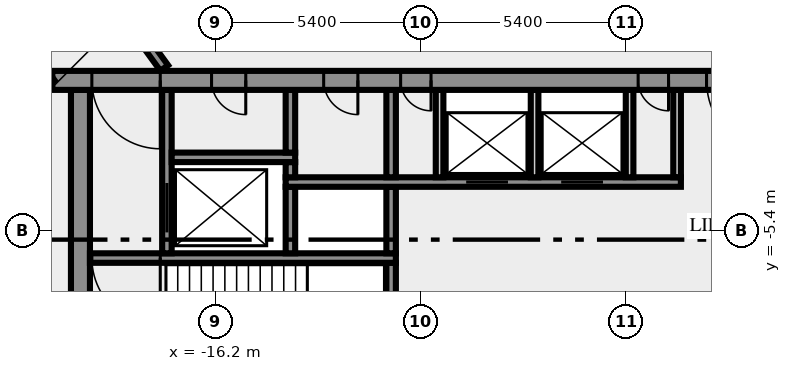
"""IFC4 building model, lengths in metres.
Left out: names, types, materials, properties, quantities, classifications, styles, units other than length and angle.
Written with IfcOpenShell. Run it as: python <this file> out.ifc"""

import sys

from ifc_helpers import new_model, si_unit, direction, frame, frame_2d, origin, place, context, subcontext, project, spatial, rectangle, extrude, element, fill, save


model = new_model("IFC4")
c1 = context("Model", 3, precision=1e-05, world=origin(), true_north=direction((0.0, 1.0)))
c2 = subcontext(c1, "Body", "Model", "MODEL_VIEW")
j1 = project(units=[si_unit("LENGTHUNIT", "METRE"), si_unit("PLANEANGLEUNIT", "RADIAN")], contexts=[c1])
p1 = place(None, origin())
s1 = spatial("IfcSite", under=j1, at=p1, CompositionType="ELEMENT")
p2 = place(p1, origin())
s2 = spatial("IfcBuilding", under=s1, at=p2, CompositionType="ELEMENT")
p3 = place(p2, frame((0.0, 0.0, 253.0)))
s3 = spatial("IfcBuildingStorey", under=s2, at=p3, CompositionType="ELEMENT", Elevation=253.0)
p4 = place(p3, frame((-19.75, -10.5, 0.0), z_axis=(0.0, 0.0, 1.0), x_axis=(0.0, 1.0, 0.0)))
e1 = element("IfcWall", 1, at=p4, inside=s3, PredefinedType="SHEAR", context=c2, shape_type="SweptSolid", body=[
    extrude(rectangle(XDim=8.8, YDim=0.5, at=frame_2d((4.4, 0.0))), origin(), (0.0, 0.0, 1.0), 3.65),
])
p5 = place(p3, frame((-11.575, -7.25, 0.0), z_axis=(0.0, 0.0, 1.0), x_axis=(0.0, 1.0, 0.0)))
e2 = element("IfcWall", 2, at=p5, inside=s3, PredefinedType="SHEAR", context=c2, shape_type="SweptSolid", body=[
    extrude(rectangle(XDim=1.0, YDim=0.25, at=frame_2d((0.5, 0.0))), origin(), (0.0, 0.0, 1.0), 3.65),
])
p6 = place(p3, frame((-11.45, -6.125, 0.0), z_axis=(0.0, 0.0, 1.0), x_axis=(-1.0, 0.0, 0.0)))
e3 = element("IfcWall", 3, at=p6, inside=s3, PredefinedType="SHEAR", context=c2, shape_type="SweptSolid", body=[
    extrude(rectangle(XDim=8.05, YDim=0.25, at=frame_2d((4.025, 0.0))), origin(), (0.0, 0.0, 1.0), 3.65),
])
p7 = place(p6, frame((6.2, 0.0, 0.0)))
e4 = element("IfcOpeningElement", 4, at=p7, cuts=e3, PredefinedType="OPENING", context=c2, shape_type="SweptSolid", body=[
    extrude(rectangle(XDim=1.8, YDim=2.1, at=frame_2d((0.9, 1.05))), frame((0.0, 0.135, 0.0), z_axis=(0.0, -1.0, 0.0), x_axis=(1.0, 0.0, 0.0)), (0.0, 0.0, 1.0), 0.27),
])
p8 = place(p3, frame((-17.475, -6.0, 0.0), z_axis=(0.0, 0.0, 1.0), x_axis=(0.0, 1.0, 0.0)))
e5 = element("IfcWall", 5, at=p8, inside=s3, PredefinedType="SHEAR", context=c2, shape_type="SweptSolid", body=[
    extrude(rectangle(XDim=4.3, YDim=0.25, at=frame_2d((2.15, 0.0))), origin(), (0.0, 0.0, 1.0), 3.65),
])
p9 = place(p8, frame((0.55, 0.0, 0.0)))
e6 = element("IfcOpeningElement", 6, at=p9, cuts=e5, PredefinedType="OPENING", context=c2, shape_type="SweptSolid", body=[
    extrude(rectangle(XDim=1.3, YDim=2.1, at=frame_2d((0.65, 1.05))), frame((0.0, 0.135, 0.0), z_axis=(0.0, -1.0, 0.0), x_axis=(1.0, 0.0, 0.0)), (0.0, 0.0, 1.0), 0.27),
])
for number, where, z_axis, x_axis in (
    (7, (-14.225, -6.0, 0.0), (0.0, 0.0, 1.0), (0.0, 1.0, 0.0)),
    (8, (-11.575, -6.0, 0.0), (0.0, 0.0, 1.0), (0.0, 1.0, 0.0)),
):
    element("IfcWall", number, at=place(p3, frame(where, z_axis=z_axis, x_axis=x_axis)), inside=s3, PredefinedType="SHEAR", context=c2, shape_type="SweptSolid", body=[
        extrude(rectangle(XDim=1.75, YDim=0.25, at=frame_2d((0.875, 0.0))), origin(), (0.0, 0.0, 1.0), 3.65),
    ])
p10 = place(p3, frame((-14.35, -4.125, 0.0), z_axis=(0.0, 0.0, 1.0), x_axis=(1.0, 0.0, 0.0)))
e9 = element("IfcWall", 9, at=p10, inside=s3, PredefinedType="SHEAR", context=c2, shape_type="SweptSolid", body=[
    extrude(rectangle(XDim=10.4, YDim=0.25, at=frame_2d((5.2, 0.0))), origin(), (0.0, 0.0, 1.0), 3.65),
])
p11 = place(p10, frame((4.75, 0.0, 0.0)))
e10 = element("IfcOpeningElement", 10, at=p11, cuts=e9, PredefinedType="OPENING", context=c2, shape_type="SweptSolid", body=[
    extrude(rectangle(XDim=1.1, YDim=2.1, at=frame_2d((0.55, 1.05))), frame((0.0, 0.135, 0.0), z_axis=(0.0, -1.0, 0.0), x_axis=(1.0, 0.0, 0.0)), (0.0, 0.0, 1.0), 0.27),
])
p12 = place(p10, frame((7.25, 0.0, 0.0)))
e11 = element("IfcOpeningElement", 11, at=p12, cuts=e9, PredefinedType="OPENING", context=c2, shape_type="SweptSolid", body=[
    extrude(rectangle(XDim=1.1, YDim=2.1, at=frame_2d((0.55, 1.05))), frame((0.0, 0.135, 0.0), z_axis=(0.0, -1.0, 0.0), x_axis=(1.0, 0.0, 0.0)), (0.0, 0.0, 1.0), 0.27),
])
p13 = place(p3, frame((-14.225, -4.0, 0.0), z_axis=(0.0, 0.0, 1.0), x_axis=(0.0, 1.0, 0.0)))
e12 = element("IfcWall", 12, at=p13, inside=s3, PredefinedType="SHEAR", context=c2, shape_type="SweptSolid", body=[
    extrude(rectangle(XDim=0.4, YDim=0.25, at=frame_2d((0.2, 0.0))), origin(), (0.0, 0.0, 1.0), 3.65),
])
p14 = place(p3, frame((-11.575, -4.0, 0.0), z_axis=(0.0, 0.0, 1.0), x_axis=(0.0, 1.0, 0.0)))
e13 = element("IfcWall", 13, at=p14, inside=s3, PredefinedType="SHEAR", context=c2, shape_type="SweptSolid", body=[
    extrude(rectangle(XDim=2.3, YDim=0.25, at=frame_2d((1.15, 0.0))), origin(), (0.0, 0.0, 1.0), 3.65),
])
for number, where, z_axis, x_axis in (
    (14, (-10.3, -4.0, 0.0), (0.0, 0.0, 1.0), (0.0, 1.0, 0.0)),
    (15, (-7.8, -4.0, 0.0), (0.0, 0.0, 1.0), (0.0, 1.0, 0.0)),
    (16, (-5.3, -4.0, 0.0), (0.0, 0.0, 1.0), (0.0, 1.0, 0.0)),
    (17, (-4.05, -4.0, 0.0), (0.0, 0.0, 1.0), (0.0, 1.0, 0.0)),
):
    element("IfcWall", number, at=place(p3, frame(where, z_axis=z_axis, x_axis=x_axis)), inside=s3, PredefinedType="SOLIDWALL", context=c2, shape_type="SweptSolid", body=[
        extrude(rectangle(XDim=2.3, YDim=0.2, at=frame_2d((1.15, 0.0))), origin(), (0.0, 0.0, 1.0), 3.65),
    ])
p15 = place(p3, frame((-17.35, -3.475, 0.0), z_axis=(0.0, 0.0, 1.0), x_axis=(1.0, 0.0, 0.0)))
e18 = element("IfcWall", 18, at=p15, inside=s3, PredefinedType="SHEAR", context=c2, shape_type="SweptSolid", body=[
    extrude(rectangle(XDim=3.25, YDim=0.25, at=frame_2d((1.625, 0.0))), origin(), (0.0, 0.0, 1.0), 3.65),
])
p16 = place(p3, frame((-14.225, -3.35, 0.0), z_axis=(0.0, 0.0, 1.0), x_axis=(0.0, 1.0, 0.0)))
e19 = element("IfcWall", 19, at=p16, inside=s3, PredefinedType="SHEAR", context=c2, shape_type="SweptSolid", body=[
    extrude(rectangle(XDim=1.65, YDim=0.25, at=frame_2d((0.825, 0.0))), origin(), (0.0, 0.0, 1.0), 3.65),
])
p17 = place(p3, frame((20.49, -1.45, 0.0), z_axis=(0.0, 0.0, 1.0), x_axis=(-1.0, 0.0, 0.0)))
e20 = element("IfcWall", 20, at=p17, inside=s3, PredefinedType="SHEAR", context=c2, shape_type="SweptSolid", body=[
    extrude(rectangle(XDim=40.98, YDim=0.5, at=frame_2d((20.49, 0.0))), origin(), (0.0, 0.0, 1.0), 3.65),
])
p18 = place(p17, frame((38.14, 0.0, 0.0)))
e21 = element("IfcOpeningElement", 21, at=p18, cuts=e20, PredefinedType="OPENING", context=c2, shape_type="SweptSolid", body=[
    extrude(rectangle(XDim=1.8, YDim=2.1, at=frame_2d((0.9, 1.05))), frame((0.0, 0.26, 0.0), z_axis=(0.0, -1.0, 0.0), x_axis=(1.0, 0.0, 0.0)), (0.0, 0.0, 1.0), 0.52),
])
p19 = place(p17, frame((35.89, 0.0, 0.0)))
e22 = element("IfcOpeningElement", 22, at=p19, cuts=e20, PredefinedType="OPENING", context=c2, shape_type="SweptSolid", body=[
    extrude(rectangle(XDim=0.9, YDim=2.1, at=frame_2d((0.45, 1.05))), frame((0.0, 0.26, 0.0), z_axis=(0.0, -1.0, 0.0), x_axis=(1.0, 0.0, 0.0)), (0.0, 0.0, 1.0), 0.52),
])
p20 = place(p17, frame((32.94, 0.0, 0.0)))
e23 = element("IfcOpeningElement", 23, at=p20, cuts=e20, PredefinedType="OPENING", context=c2, shape_type="SweptSolid", body=[
    extrude(rectangle(XDim=0.9, YDim=2.1, at=frame_2d((0.45, 1.05))), frame((0.0, 0.26, 0.0), z_axis=(0.0, -1.0, 0.0), x_axis=(1.0, 0.0, 0.0)), (0.0, 0.0, 1.0), 0.52),
])
p21 = place(p17, frame((31.015, 0.0, 0.0)))
e24 = element("IfcOpeningElement", 24, at=p21, cuts=e20, PredefinedType="OPENING", context=c2, shape_type="SweptSolid", body=[
    extrude(rectangle(XDim=0.8, YDim=2.1, at=frame_2d((0.4, 1.05))), frame((0.0, 0.26, 0.0), z_axis=(0.0, -1.0, 0.0), x_axis=(1.0, 0.0, 0.0)), (0.0, 0.0, 1.0), 0.52),
])
p22 = place(p17, frame((24.765, 0.0, 0.0)))
e25 = element("IfcOpeningElement", 25, at=p22, cuts=e20, PredefinedType="OPENING", context=c2, shape_type="SweptSolid", body=[
    extrude(rectangle(XDim=0.8, YDim=2.1, at=frame_2d((0.4, 1.05))), frame((0.0, 0.26, 0.0), z_axis=(0.0, -1.0, 0.0), x_axis=(1.0, 0.0, 0.0)), (0.0, 0.0, 1.0), 0.52),
])
p23 = place(p17, frame((21.765, 0.0, 0.0)))
e26 = element("IfcOpeningElement", 26, at=p23, cuts=e20, PredefinedType="OPENING", context=c2, shape_type="SweptSolid", body=[
    extrude(rectangle(XDim=2.0, YDim=2.1, at=frame_2d((1.0, 1.05))), frame((0.0, 0.26, 0.0), z_axis=(0.0, -1.0, 0.0), x_axis=(1.0, 0.0, 0.0)), (0.0, 0.0, 1.0), 0.52),
])
p24 = place(p17, frame((14.202, 0.0, 0.0)))
e27 = element("IfcOpeningElement", 27, at=p24, cuts=e20, PredefinedType="OPENING", context=c2, shape_type="SweptSolid", body=[
    extrude(rectangle(XDim=0.9, YDim=2.1, at=frame_2d((0.45, 1.05))), frame((0.0, 0.26, 0.0), z_axis=(0.0, -1.0, 0.0), x_axis=(1.0, 0.0, 0.0)), (0.0, 0.0, 1.0), 0.52),
])
p25 = place(p17, frame((10.478, 0.0, 0.0)))
e28 = element("IfcOpeningElement", 28, at=p25, cuts=e20, PredefinedType="OPENING", context=c2, shape_type="SweptSolid", body=[
    extrude(rectangle(XDim=0.9, YDim=2.1, at=frame_2d((0.45, 1.05))), frame((0.0, 0.26, 0.0), z_axis=(0.0, -1.0, 0.0), x_axis=(1.0, 0.0, 0.0)), (0.0, 0.0, 1.0), 0.52),
])
p26 = place(p17, frame((7.14, 0.0, 0.0)))
e29 = element("IfcOpeningElement", 29, at=p26, cuts=e20, PredefinedType="OPENING", context=c2, shape_type="SweptSolid", body=[
    extrude(rectangle(XDim=0.9, YDim=2.1, at=frame_2d((0.45, 1.05))), frame((0.0, 0.26, 0.0), z_axis=(0.0, -1.0, 0.0), x_axis=(1.0, 0.0, 0.0)), (0.0, 0.0, 1.0), 0.52),
])
p27 = place(p17, frame((5.028, 0.0, 0.0)))
e30 = element("IfcOpeningElement", 30, at=p27, cuts=e20, PredefinedType="OPENING", context=c2, shape_type="SweptSolid", body=[
    extrude(rectangle(XDim=0.8, YDim=2.1, at=frame_2d((0.4, 1.05))), frame((0.0, 0.26, 0.0), z_axis=(0.0, -1.0, 0.0), x_axis=(1.0, 0.0, 0.0)), (0.0, 0.0, 1.0), 0.52),
])
p28 = place(p17, frame((3.452, 0.0, 0.0)))
e31 = element("IfcOpeningElement", 31, at=p28, cuts=e20, PredefinedType="OPENING", context=c2, shape_type="SweptSolid", body=[
    extrude(rectangle(XDim=0.8, YDim=2.1, at=frame_2d((0.4, 1.05))), frame((0.0, 0.26, 0.0), z_axis=(0.0, -1.0, 0.0), x_axis=(1.0, 0.0, 0.0)), (0.0, 0.0, 1.0), 0.52),
])
p29 = place(p17, frame((1.04, 0.0, 0.0)))
e32 = element("IfcOpeningElement", 32, at=p29, cuts=e20, PredefinedType="OPENING", context=c2, shape_type="SweptSolid", body=[
    extrude(rectangle(XDim=1.8, YDim=2.1, at=frame_2d((0.9, 1.05))), frame((0.0, 0.26, 0.0), z_axis=(0.0, -1.0, 0.0), x_axis=(1.0, 0.0, 0.0)), (0.0, 0.0, 1.0), 0.52),
])
p30 = place(p3, frame((-20.531, -1.523, 0.0), z_axis=(0.0, 0.0, 1.0), x_axis=(-0.587782646447, 0.809018887626, 0.0)))
e33 = element("IfcWall", 33, at=p30, inside=s3, PredefinedType="SOLIDWALL", context=c2, shape_type="SweptSolid", body=[
    extrude(rectangle(XDim=11.27, YDim=0.25, at=frame_2d((5.635, 0.0))), origin(), (0.0, 0.0, 1.0), 3.65),
])
p31 = place(p30, frame((0.533, 0.0, 0.0)))
e34 = element("IfcOpeningElement", 34, at=p31, cuts=e33, PredefinedType="OPENING", context=c2, shape_type="SweptSolid", body=[
    extrude(rectangle(XDim=0.9, YDim=2.1, at=frame_2d((0.45, 1.05))), frame((0.0, 0.135, 0.0), z_axis=(0.0, -1.0, 0.0), x_axis=(1.0, 0.0, 0.0)), (0.0, 0.0, 1.0), 0.27),
])
p32 = place(p3, frame((-24.865, 8.95, 0.0), z_axis=(0.0, 0.0, 1.0), x_axis=(0.587791617212, -0.809012369952, 0.0)))
e35 = element("IfcWall", 35, at=p32, inside=s3, PredefinedType="SOLIDWALL", context=c2, shape_type="SweptSolid", body=[
    extrude(rectangle(XDim=12.453, YDim=0.25, at=frame_2d((6.227, 0.0))), origin(), (0.0, 0.0, 1.0), 3.65),
])
p33 = place(p32, frame((8.112, 0.0, 0.0)))
e36 = element("IfcOpeningElement", 36, at=p33, cuts=e35, PredefinedType="OPENING", context=c2, shape_type="SweptSolid", body=[
    extrude(rectangle(XDim=0.9, YDim=2.1, at=frame_2d((0.45, 1.05))), frame((0.0, 0.135, 0.0), z_axis=(0.0, -1.0, 0.0), x_axis=(1.0, 0.0, 0.0)), (0.0, 0.0, 1.0), 0.27),
])
p34 = place(p7, origin())
e37 = element("IfcDoor", 37, at=p34, inside=s3, OperationType="DOUBLE_DOOR_SINGLE_SWING", PredefinedType="DOOR", context=c2, shape_type="SweptSolid", body=[
    extrude(rectangle(XDim=1.8, YDim=2.1, at=frame_2d((0.9, 1.05))), frame((0.0, 0.025, 0.0), z_axis=(0.0, -1.0, 0.0), x_axis=(1.0, 0.0, 0.0)), (0.0, 0.0, 1.0), 0.05),
])
fill(e4, e37)
p35 = place(p9, origin())
e38 = element("IfcDoor", 38, at=p35, inside=s3, OperationType="DOUBLE_DOOR_SLIDING", PredefinedType="DOOR", context=c2, shape_type="SweptSolid", body=[
    extrude(rectangle(XDim=1.3, YDim=2.1, at=frame_2d((0.65, 1.05))), frame((0.0, 0.025, 0.0), z_axis=(0.0, -1.0, 0.0), x_axis=(1.0, 0.0, 0.0)), (0.0, 0.0, 1.0), 0.05),
])
fill(e6, e38)
p36 = place(p11, origin())
e39 = element("IfcDoor", 39, at=p36, inside=s3, OperationType="DOUBLE_DOOR_SLIDING", PredefinedType="DOOR", context=c2, shape_type="SweptSolid", body=[
    extrude(rectangle(XDim=1.1, YDim=2.1, at=frame_2d((0.55, 1.05))), frame((0.0, 0.025, 0.0), z_axis=(0.0, -1.0, 0.0), x_axis=(1.0, 0.0, 0.0)), (0.0, 0.0, 1.0), 0.05),
])
fill(e10, e39)
p37 = place(p12, origin())
e40 = element("IfcDoor", 40, at=p37, inside=s3, OperationType="DOUBLE_DOOR_SLIDING", PredefinedType="DOOR", context=c2, shape_type="SweptSolid", body=[
    extrude(rectangle(XDim=1.1, YDim=2.1, at=frame_2d((0.55, 1.05))), frame((0.0, 0.025, 0.0), z_axis=(0.0, -1.0, 0.0), x_axis=(1.0, 0.0, 0.0)), (0.0, 0.0, 1.0), 0.05),
])
fill(e11, e40)
p38 = place(p18, origin())
e41 = element("IfcDoor", 41, at=p38, inside=s3, OperationType="DOUBLE_DOOR_SINGLE_SWING", PredefinedType="DOOR", context=c2, shape_type="SweptSolid", body=[
    extrude(rectangle(XDim=1.8, YDim=2.1, at=frame_2d((0.9, 1.05))), frame((0.0, 0.025, 0.0), z_axis=(0.0, -1.0, 0.0), x_axis=(1.0, 0.0, 0.0)), (0.0, 0.0, 1.0), 0.05),
])
fill(e21, e41)
p39 = place(p19, origin())
e42 = element("IfcDoor", 42, at=p39, inside=s3, OperationType="SINGLE_SWING_RIGHT", PredefinedType="DOOR", context=c2, shape_type="SweptSolid", body=[
    extrude(rectangle(XDim=0.9, YDim=2.1, at=frame_2d((0.45, 1.05))), frame((0.0, 0.025, 0.0), z_axis=(0.0, -1.0, 0.0), x_axis=(1.0, 0.0, 0.0)), (0.0, 0.0, 1.0), 0.05),
])
fill(e22, e42)
p40 = place(p20, origin())
e43 = element("IfcDoor", 43, at=p40, inside=s3, OperationType="SINGLE_SWING_RIGHT", PredefinedType="DOOR", context=c2, shape_type="SweptSolid", body=[
    extrude(rectangle(XDim=0.9, YDim=2.1, at=frame_2d((0.45, 1.05))), frame((0.0, 0.025, 0.0), z_axis=(0.0, -1.0, 0.0), x_axis=(1.0, 0.0, 0.0)), (0.0, 0.0, 1.0), 0.05),
])
fill(e23, e43)
p41 = place(p21, origin())
e44 = element("IfcDoor", 44, at=p41, inside=s3, OperationType="SINGLE_SWING_RIGHT", PredefinedType="DOOR", context=c2, shape_type="SweptSolid", body=[
    extrude(rectangle(XDim=0.8, YDim=2.1, at=frame_2d((0.4, 1.05))), frame((0.0, 0.025, 0.0), z_axis=(0.0, -1.0, 0.0), x_axis=(1.0, 0.0, 0.0)), (0.0, 0.0, 1.0), 0.05),
])
fill(e24, e44)
p42 = place(p22, origin())
e45 = element("IfcDoor", 45, at=p42, inside=s3, OperationType="SINGLE_SWING_RIGHT", PredefinedType="DOOR", context=c2, shape_type="SweptSolid", body=[
    extrude(rectangle(XDim=0.8, YDim=2.1, at=frame_2d((0.4, 1.05))), frame((0.0, 0.025, 0.0), z_axis=(0.0, -1.0, 0.0), x_axis=(1.0, 0.0, 0.0)), (0.0, 0.0, 1.0), 0.05),
])
fill(e25, e45)
p43 = place(p23, origin())
e46 = element("IfcDoor", 46, at=p43, inside=s3, OperationType="DOUBLE_DOOR_SINGLE_SWING", PredefinedType="DOOR", context=c2, shape_type="SweptSolid", body=[
    extrude(rectangle(XDim=2.0, YDim=2.1, at=frame_2d((1.0, 1.05))), frame((0.0, 0.025, 0.0), z_axis=(0.0, -1.0, 0.0), x_axis=(1.0, 0.0, 0.0)), (0.0, 0.0, 1.0), 0.05),
])
fill(e26, e46)
save(model, sys.argv[1])
